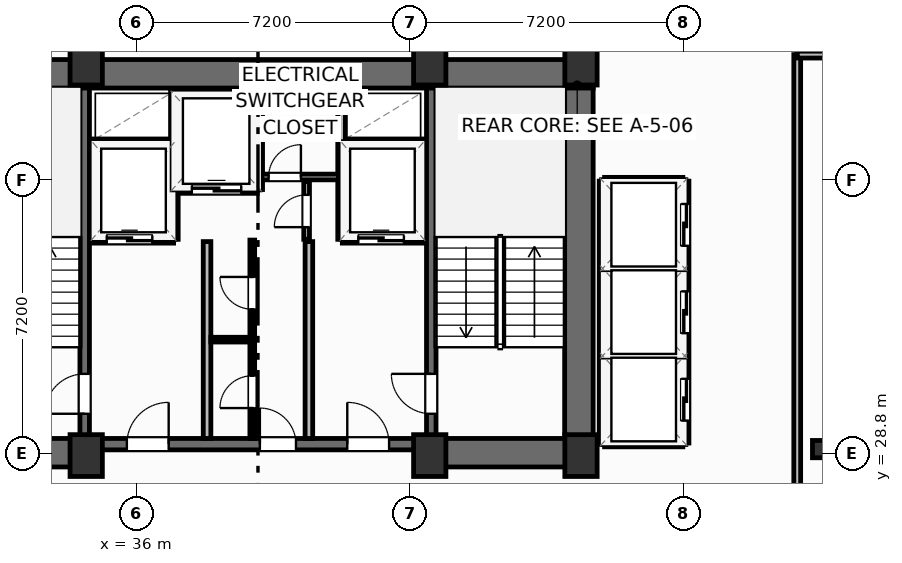
"""IFC4 building model, lengths in metres.
Left out: names, types, materials, properties, quantities, classifications, styles, units other than length and angle.
Written with IfcOpenShell. Run it as: python <this file> out.ifc"""

import sys

from ifc_helpers import new_model, si_unit, direction, frame, frame_2d, origin, origin_2d, place, context, subcontext, project, spatial, rectangle, i_section, extrude, element, fill, save


model = new_model("IFC4")
c1 = context("Model", 3, precision=1e-05, world=origin(), true_north=direction((0.0, 1.0)))
c2 = subcontext(c1, "Body", "Model", "MODEL_VIEW")
j1 = project(units=[si_unit("LENGTHUNIT", "METRE"), si_unit("PLANEANGLEUNIT", "RADIAN")], contexts=[c1])
p1 = place(None, origin())
s1 = spatial("IfcSite", under=j1, at=p1, CompositionType="ELEMENT")
p2 = place(p1, origin())
s2 = spatial("IfcBuilding", under=s1, at=p2, CompositionType="ELEMENT")
p3 = place(p2, frame((0.0, 0.0, 155.0)))
s3 = spatial("IfcBuildingStorey", under=s2, at=p3, CompositionType="ELEMENT", Elevation=155.0)
for number, where, z_axis, x_axis in (
    (1, (34.68, 28.75, 0.0), (0.0, 0.0, 1.0), (1.0, 0.0, 0.0)),
    (2, (43.72, 28.75, 0.0), (0.0, 0.0, 1.0), (1.0, 0.0, 0.0)),
    (3, (47.7, 28.75, 0.0), (0.0, 0.0, 1.0), (1.0, 0.0, 0.0)),
    (4, (34.68, 39.05, 0.0), (0.0, 0.0, 1.0), (1.0, 0.0, 0.0)),
    (5, (43.72, 39.05, 0.0), (0.0, 0.0, 1.0), (1.0, 0.0, 0.0)),
    (6, (47.7, 39.05, 0.0), (0.0, 0.0, 1.0), (1.0, 0.0, 0.0)),
):
    element("IfcColumn", number, at=place(p3, frame(where, z_axis=z_axis, x_axis=x_axis)), inside=s3, PredefinedType="COLUMN", context=c2, shape_type="SweptSolid", body=[
        extrude(rectangle(XDim=0.85, YDim=1.1, at=origin_2d()), origin(), (0.0, 0.0, 1.0), 3.7),
    ])
p4 = place(p3, frame((54.0, 28.92, 0.0), z_axis=(0.0, 0.0, 1.0), x_axis=(1.0, 0.0, 0.0)))
e7 = element("IfcColumn", 7, at=p4, inside=s3, PredefinedType="COLUMN", context=c2, shape_type="SweptSolid", body=[
    extrude(i_section(OverallWidth=0.418, OverallDepth=0.455, WebThickness=0.042, FlangeThickness=0.068, FilletRadius=0.025, at=origin_2d()), origin(), (0.0, 0.0, 1.0), 3.7),
])
p5 = place(p3, frame((30.38, 38.795, 0.0), z_axis=(0.0, 0.0, 1.0), x_axis=(1.0, 0.0, 0.0)))
e8 = element("IfcWall", 8, at=p5, inside=s3, PredefinedType="SHEAR", context=c2, shape_type="SweptSolid", body=[
    extrude(rectangle(XDim=17.64, YDim=0.75, at=frame_2d((8.82, 0.0))), origin(), (0.0, 0.0, 1.0), 3.45),
])
p6 = place(p3, frame((47.645, 29.2, 0.0), z_axis=(0.0, 0.0, 1.0), x_axis=(0.0, 1.0, 0.0)))
e9 = element("IfcWall", 9, at=p6, inside=s3, PredefinedType="SHEAR", context=c2, shape_type="SweptSolid", body=[
    extrude(rectangle(XDim=9.22, YDim=0.75, at=frame_2d((4.61, 0.0))), origin(), (0.0, 0.0, 1.0), 3.45),
])
p7 = place(p3, frame((30.38, 28.825, 0.0), z_axis=(0.0, 0.0, 1.0), x_axis=(1.0, 0.0, 0.0)))
e10 = element("IfcWall", 10, at=p7, inside=s3, PredefinedType="SHEAR", context=c2, shape_type="SweptSolid", body=[
    extrude(rectangle(XDim=4.42, YDim=0.75, at=frame_2d((2.21, 0.0))), origin(), (0.0, 0.0, 1.0), 3.45),
])
p8 = place(p3, frame((43.6, 28.825, 0.0), z_axis=(0.0, 0.0, 1.0), x_axis=(1.0, 0.0, 0.0)))
e11 = element("IfcWall", 11, at=p8, inside=s3, PredefinedType="SHEAR", context=c2, shape_type="SweptSolid", body=[
    extrude(rectangle(XDim=4.42, YDim=0.75, at=frame_2d((2.21, 0.0))), origin(), (0.0, 0.0, 1.0), 3.45),
])
p9 = place(p3, frame((34.8, 29.05, 0.0), z_axis=(0.0, 0.0, 1.0), x_axis=(1.0, 0.0, 0.0)))
e12 = element("IfcWall", 12, at=p9, inside=s3, PredefinedType="SHEAR", context=c2, shape_type="SweptSolid", body=[
    extrude(rectangle(XDim=8.8, YDim=0.3, at=frame_2d((4.4, 0.0))), origin(), (0.0, 0.0, 1.0), 3.45),
])
p10 = place(p9, frame((0.95, 0.0, 0.0)))
e13 = element("IfcOpeningElement", 13, at=p10, cuts=e12, PredefinedType="OPENING", context=c2, shape_type="SweptSolid", body=[
    extrude(rectangle(XDim=1.1, YDim=2.15, at=frame_2d((0.55, 1.075))), frame((0.0, 0.16, 0.0), z_axis=(0.0, -1.0, 0.0), x_axis=(1.0, 0.0, 0.0)), (0.0, 0.0, 1.0), 0.32),
])
p11 = place(p9, frame((6.75, 0.0, 0.0)))
e14 = element("IfcOpeningElement", 14, at=p11, cuts=e12, PredefinedType="OPENING", context=c2, shape_type="SweptSolid", body=[
    extrude(rectangle(XDim=1.1, YDim=2.15, at=frame_2d((0.55, 1.075))), frame((0.0, 0.16, 0.0), z_axis=(0.0, -1.0, 0.0), x_axis=(1.0, 0.0, 0.0)), (0.0, 0.0, 1.0), 0.32),
])
p12 = place(p9, frame((4.45, 0.0, 0.0)))
e15 = element("IfcOpeningElement", 15, at=p12, cuts=e12, PredefinedType="OPENING", context=c2, shape_type="SweptSolid", body=[
    extrude(rectangle(XDim=0.95, YDim=2.15, at=frame_2d((0.475, 1.075))), frame((0.0, 0.16, 0.0), z_axis=(0.0, -1.0, 0.0), x_axis=(1.0, 0.0, 0.0)), (0.0, 0.0, 1.0), 0.32),
])
p13 = place(p3, frame((34.64, 29.2, 0.0), z_axis=(0.0, 0.0, 1.0), x_axis=(0.0, 1.0, 0.0)))
e16 = element("IfcWall", 16, at=p13, inside=s3, PredefinedType="SHEAR", context=c2, shape_type="SweptSolid", body=[
    extrude(rectangle(XDim=9.22, YDim=0.25, at=frame_2d((4.61, 0.0))), origin(), (0.0, 0.0, 1.0), 3.45),
])
p14 = place(p13, frame((0.65, 0.0, 0.0)))
e17 = element("IfcOpeningElement", 17, at=p14, cuts=e16, PredefinedType="OPENING", context=c2, shape_type="SweptSolid", body=[
    extrude(rectangle(XDim=1.05, YDim=2.15, at=frame_2d((0.525, 1.075))), frame((0.0, 0.135, 0.0), z_axis=(0.0, -1.0, 0.0), x_axis=(1.0, 0.0, 0.0)), (0.0, 0.0, 1.0), 0.27),
])
p15 = place(p3, frame((43.76, 29.2, 0.0), z_axis=(0.0, 0.0, 1.0), x_axis=(0.0, 1.0, 0.0)))
e18 = element("IfcWall", 18, at=p15, inside=s3, PredefinedType="SHEAR", context=c2, shape_type="SweptSolid", body=[
    extrude(rectangle(XDim=9.22, YDim=0.25, at=frame_2d((4.61, 0.0))), origin(), (0.0, 0.0, 1.0), 3.45),
])
p16 = place(p15, frame((0.65, 0.0, 0.0)))
e19 = element("IfcOpeningElement", 19, at=p16, cuts=e18, PredefinedType="OPENING", context=c2, shape_type="SweptSolid", body=[
    extrude(rectangle(XDim=1.05, YDim=2.15, at=frame_2d((0.525, 1.075))), frame((0.0, 0.135, 0.0), z_axis=(0.0, -1.0, 0.0), x_axis=(1.0, 0.0, 0.0)), (0.0, 0.0, 1.0), 0.27),
])
p17 = place(p3, frame((53.45, 39.3, 0.0), z_axis=(0.0, 0.0, 1.0), x_axis=(0.0, 1.0, 0.0)))
e20 = element("IfcWall", 20, at=p17, inside=s3, PredefinedType="PARTITIONING", context=c2, shape_type="SweptSolid", body=[
    extrude(rectangle(XDim=2.31, YDim=0.125, at=frame_2d((1.155, 0.0))), origin(), (0.0, 0.0, 1.0), 3.45),
])
p18 = place(p3, frame((53.39, 19.24, 0.0), z_axis=(0.0, 0.0, 1.0), x_axis=(0.0, 1.0, 0.0)))
e21 = element("IfcWall", 21, at=p18, inside=s3, PredefinedType="PARTITIONING", context=c2, shape_type="SweptSolid", body=[
    extrude(rectangle(XDim=20.06, YDim=0.18, at=frame_2d((10.03, 0.0))), origin(), (0.0, 0.0, 1.0), 3.45),
])
p19 = place(p18, frame((7.7, 0.0, 0.0)))
e22 = element("IfcOpeningElement", 22, at=p19, cuts=e21, PredefinedType="OPENING", context=c2, shape_type="SweptSolid", body=[
    extrude(rectangle(XDim=0.95, YDim=2.05, at=frame_2d((0.475, 1.025))), frame((0.0, 0.1, 0.0), z_axis=(0.0, -1.0, 0.0), x_axis=(1.0, 0.0, 0.0)), (0.0, 0.0, 1.0), 0.2),
])
p20 = place(p3, frame((53.39, 39.3, 0.0), z_axis=(0.0, 0.0, 1.0), x_axis=(1.0, 0.0, 0.0)))
e23 = element("IfcWall", 23, at=p20, inside=s3, PredefinedType="PARTITIONING", context=c2, shape_type="SweptSolid", body=[
    extrude(rectangle(XDim=24.74, YDim=0.18, at=frame_2d((12.37, 0.0))), origin(), (0.0, 0.0, 1.0), 3.45),
])
for number, where, z_axis, x_axis in (
    (24, (37.86, 29.2, 0.0), (0.0, 0.0, 1.0), (0.0, 1.0, 0.0)),
    (25, (40.54, 29.2, 0.0), (0.0, 0.0, 1.0), (0.0, 1.0, 0.0)),
):
    element("IfcWall", number, at=place(p3, frame(where, z_axis=z_axis, x_axis=x_axis)), inside=s3, PredefinedType="PARTITIONING", context=c2, shape_type="SweptSolid", body=[
        extrude(rectangle(XDim=5.18, YDim=0.2, at=frame_2d((2.59, 0.0))), origin(), (0.0, 0.0, 1.0), 3.45),
    ])
p21 = place(p3, frame((34.8, 34.44, 0.0), z_axis=(0.0, 0.0, 1.0), x_axis=(1.0, 0.0, 0.0)))
e26 = element("IfcWall", 26, at=p21, inside=s3, PredefinedType="PARTITIONING", context=c2, shape_type="SweptSolid", body=[
    extrude(rectangle(XDim=2.18, YDim=0.2, at=frame_2d((1.09, 0.0))), origin(), (0.0, 0.0, 1.0), 3.45),
])
p22 = place(p21, frame((0.42, 0.0, 0.0)))
e27 = element("IfcOpeningElement", 27, at=p22, cuts=e26, PredefinedType="OPENING", context=c2, shape_type="SweptSolid", body=[
    extrude(rectangle(XDim=1.2, YDim=2.2, at=frame_2d((0.6, 1.1))), frame((0.0, 0.11, 0.0), z_axis=(0.0, -1.0, 0.0), x_axis=(1.0, 0.0, 0.0)), (0.0, 0.0, 1.0), 0.22),
])
p23 = place(p3, frame((34.8, 36.98, 0.0), z_axis=(0.0, 0.0, 1.0), x_axis=(1.0, 0.0, 0.0)))
e28 = element("IfcWall", 28, at=p23, inside=s3, PredefinedType="PARTITIONING", context=c2, shape_type="SweptSolid", body=[
    extrude(rectangle(XDim=2.18, YDim=0.2, at=frame_2d((1.09, 0.0))), origin(), (0.0, 0.0, 1.0), 3.45),
])
p24 = place(p3, frame((37.0, 34.44, 0.0), z_axis=(0.0, 0.0, 1.0), x_axis=(0.0, 1.0, 0.0)))
e29 = element("IfcWall", 29, at=p24, inside=s3, PredefinedType="PARTITIONING", context=c2, shape_type="SweptSolid", body=[
    extrude(rectangle(XDim=3.9, YDim=0.2, at=frame_2d((1.95, 0.0))), origin(), (0.0, 0.0, 1.0), 3.45),
])
p25 = place(p3, frame((41.42, 34.44, 0.0), z_axis=(0.0, 0.0, 1.0), x_axis=(1.0, 0.0, 0.0)))
e30 = element("IfcWall", 30, at=p25, inside=s3, PredefinedType="PARTITIONING", context=c2, shape_type="SweptSolid", body=[
    extrude(rectangle(XDim=2.18, YDim=0.2, at=frame_2d((1.09, 0.0))), origin(), (0.0, 0.0, 1.0), 3.45),
])
p26 = place(p25, frame((0.42, 0.0, 0.0)))
e31 = element("IfcOpeningElement", 31, at=p26, cuts=e30, PredefinedType="OPENING", context=c2, shape_type="SweptSolid", body=[
    extrude(rectangle(XDim=1.2, YDim=2.2, at=frame_2d((0.6, 1.1))), frame((0.0, 0.11, 0.0), z_axis=(0.0, -1.0, 0.0), x_axis=(1.0, 0.0, 0.0)), (0.0, 0.0, 1.0), 0.22),
])
p27 = place(p3, frame((41.42, 36.98, 0.0), z_axis=(0.0, 0.0, 1.0), x_axis=(1.0, 0.0, 0.0)))
e32 = element("IfcWall", 32, at=p27, inside=s3, PredefinedType="PARTITIONING", context=c2, shape_type="SweptSolid", body=[
    extrude(rectangle(XDim=2.18, YDim=0.2, at=frame_2d((1.09, 0.0))), origin(), (0.0, 0.0, 1.0), 3.45),
])
p28 = place(p3, frame((41.4, 34.44, 0.0), z_axis=(0.0, 0.0, 1.0), x_axis=(0.0, 1.0, 0.0)))
e33 = element("IfcWall", 33, at=p28, inside=s3, PredefinedType="PARTITIONING", context=c2, shape_type="SweptSolid", body=[
    extrude(rectangle(XDim=3.9, YDim=0.2, at=frame_2d((1.95, 0.0))), origin(), (0.0, 0.0, 1.0), 3.45),
])
p29 = place(p3, frame((37.06, 35.75, 0.0), z_axis=(0.0, 0.0, 1.0), x_axis=(1.0, 0.0, 0.0)))
e34 = element("IfcWall", 34, at=p29, inside=s3, PredefinedType="PARTITIONING", context=c2, shape_type="SweptSolid", body=[
    extrude(rectangle(XDim=2.12, YDim=0.2, at=frame_2d((1.06, 0.0))), origin(), (0.0, 0.0, 1.0), 3.45),
])
p30 = place(p29, frame((0.4, 0.0, 0.0)))
e35 = element("IfcOpeningElement", 35, at=p30, cuts=e34, PredefinedType="OPENING", context=c2, shape_type="SweptSolid", body=[
    extrude(rectangle(XDim=1.3, YDim=2.2, at=frame_2d((0.65, 1.1))), frame((0.0, 0.11, 0.0), z_axis=(0.0, -1.0, 0.0), x_axis=(1.0, 0.0, 0.0)), (0.0, 0.0, 1.0), 0.22),
])
p31 = place(p3, frame((39.22, 35.75, 0.0), z_axis=(0.0, 0.0, 1.0), x_axis=(0.0, 1.0, 0.0)))
e36 = element("IfcWall", 36, at=p31, inside=s3, PredefinedType="PARTITIONING", context=c2, shape_type="SweptSolid", body=[
    extrude(rectangle(XDim=2.59, YDim=0.2, at=frame_2d((1.295, 0.0))), origin(), (0.0, 0.0, 1.0), 3.45),
])
p32 = place(p3, frame((39.3, 36.08, 0.0), z_axis=(0.0, 0.0, 1.0), x_axis=(1.0, 0.0, 0.0)))
e37 = element("IfcWall", 37, at=p32, inside=s3, PredefinedType="PARTITIONING", context=c2, shape_type="SweptSolid", body=[
    extrude(rectangle(XDim=2.02, YDim=0.15, at=frame_2d((1.01, 0.0))), origin(), (0.0, 0.0, 1.0), 3.45),
])
p33 = place(p32, frame((0.18, 0.0, 0.0)))
e38 = element("IfcOpeningElement", 38, at=p33, cuts=e37, PredefinedType="OPENING", context=c2, shape_type="SweptSolid", body=[
    extrude(rectangle(XDim=0.85, YDim=2.05, at=frame_2d((0.425, 1.025))), frame((0.0, 0.085, 0.0), z_axis=(0.0, -1.0, 0.0), x_axis=(1.0, 0.0, 0.0)), (0.0, 0.0, 1.0), 0.17),
])
p34 = place(p3, frame((40.48, 34.44, 0.0), z_axis=(0.0, 0.0, 1.0), x_axis=(0.0, 1.0, 0.0)))
e39 = element("IfcWall", 39, at=p34, inside=s3, PredefinedType="PARTITIONING", context=c2, shape_type="SweptSolid", body=[
    extrude(rectangle(XDim=1.52, YDim=0.15, at=frame_2d((0.76, 0.0))), origin(), (0.0, 0.0, 1.0), 3.45),
])
p35 = place(p34, frame((0.32, 0.0, 0.0)))
e40 = element("IfcOpeningElement", 40, at=p35, cuts=e39, PredefinedType="OPENING", context=c2, shape_type="SweptSolid", body=[
    extrude(rectangle(XDim=0.85, YDim=2.05, at=frame_2d((0.425, 1.025))), frame((0.0, 0.085, 0.0), z_axis=(0.0, -1.0, 0.0), x_axis=(1.0, 0.0, 0.0)), (0.0, 0.0, 1.0), 0.17),
])
p36 = place(p3, frame((37.96, 31.8, 0.0), z_axis=(0.0, 0.0, 1.0), x_axis=(1.0, 0.0, 0.0)))
e41 = element("IfcWall", 41, at=p36, inside=s3, PredefinedType="PARTITIONING", context=c2, shape_type="SweptSolid", body=[
    extrude(rectangle(XDim=1.09, YDim=0.125, at=frame_2d((0.545, 0.0))), origin(), (0.0, 0.0, 1.0), 3.45),
])
p37 = place(p3, frame((39.05, 29.2, 0.0), z_axis=(0.0, 0.0, 1.0), x_axis=(0.0, 1.0, 0.0)))
e42 = element("IfcWall", 42, at=p37, inside=s3, PredefinedType="PARTITIONING", context=c2, shape_type="SweptSolid", body=[
    extrude(rectangle(XDim=5.22, YDim=0.125, at=frame_2d((2.61, 0.0))), origin(), (0.0, 0.0, 1.0), 3.45),
])
p38 = place(p37, frame((0.8, 0.0, 0.0)))
e43 = element("IfcOpeningElement", 43, at=p38, cuts=e42, PredefinedType="OPENING", context=c2, shape_type="SweptSolid", body=[
    extrude(rectangle(XDim=0.85, YDim=2.05, at=frame_2d((0.425, 1.025))), frame((0.0, 0.073, 0.0), z_axis=(0.0, -1.0, 0.0), x_axis=(1.0, 0.0, 0.0)), (0.0, 0.0, 1.0), 0.145),
])
p39 = place(p37, frame((3.4, 0.0, 0.0)))
e44 = element("IfcOpeningElement", 44, at=p39, cuts=e42, PredefinedType="OPENING", context=c2, shape_type="SweptSolid", body=[
    extrude(rectangle(XDim=0.85, YDim=2.05, at=frame_2d((0.425, 1.025))), frame((0.0, 0.073, 0.0), z_axis=(0.0, -1.0, 0.0), x_axis=(1.0, 0.0, 0.0)), (0.0, 0.0, 1.0), 0.145),
])
for number, where, z_axis, x_axis in (
    (45, (48.32, 31.375, 0.0), (0.0, 0.0, 1.0), (1.0, 0.0, 0.0)),
    (46, (48.32, 33.675, 0.0), (0.0, 0.0, 1.0), (1.0, 0.0, 0.0)),
):
    element("IfcWall", number, at=place(p3, frame(where, z_axis=z_axis, x_axis=x_axis)), inside=s3, PredefinedType="PARTITIONING", context=c2, shape_type="SweptSolid", body=[
        extrude(rectangle(XDim=2.06, YDim=0.2, at=frame_2d((1.03, 0.0))), origin(), (0.0, 0.0, 1.0), 3.45),
    ])
p40 = place(p3, frame((48.32, 29.08, 0.0), z_axis=(0.0, 0.0, 1.0), x_axis=(1.0, 0.0, 0.0)))
e47 = element("IfcWall", 47, at=p40, inside=s3, PredefinedType="PARTITIONING", context=c2, shape_type="SweptSolid", body=[
    extrude(rectangle(XDim=2.06, YDim=0.2, at=frame_2d((1.03, 0.0))), origin(), (0.0, 0.0, 1.0), 2.662),
])
p41 = place(p3, frame((48.32, 35.97, 0.0), z_axis=(0.0, 0.0, 1.0), x_axis=(1.0, 0.0, 0.0)))
e48 = element("IfcWall", 48, at=p41, inside=s3, PredefinedType="PARTITIONING", context=c2, shape_type="SweptSolid", body=[
    extrude(rectangle(XDim=2.06, YDim=0.2, at=frame_2d((1.03, 0.0))), origin(), (0.0, 0.0, 1.0), 3.45),
])
p42 = place(p3, frame((48.28, 29.08, 0.0), z_axis=(0.0, 0.0, 1.0), x_axis=(0.0, 1.0, 0.0)))
e49 = element("IfcWall", 49, at=p42, inside=s3, PredefinedType="PARTITIONING", context=c2, shape_type="SweptSolid", body=[
    extrude(rectangle(XDim=6.89, YDim=0.2, at=frame_2d((3.445, 0.0))), origin(), (0.0, 0.0, 1.0), 3.45),
])
p43 = place(p3, frame((50.44, 29.08, 0.0), z_axis=(0.0, 0.0, 1.0), x_axis=(0.0, 1.0, 0.0)))
e50 = element("IfcWall", 50, at=p43, inside=s3, PredefinedType="PARTITIONING", context=c2, shape_type="SweptSolid", body=[
    extrude(rectangle(XDim=6.89, YDim=0.2, at=frame_2d((3.445, 0.0))), origin(), (0.0, 0.0, 1.0), 3.45),
])
p44 = place(p43, frame((0.59, 0.0, 0.0)))
e51 = element("IfcOpeningElement", 51, at=p44, cuts=e50, PredefinedType="OPENING", context=c2, shape_type="SweptSolid", body=[
    extrude(rectangle(XDim=1.1, YDim=2.15, at=frame_2d((0.55, 1.075))), frame((0.0, 0.11, 0.0), z_axis=(0.0, -1.0, 0.0), x_axis=(1.0, 0.0, 0.0)), (0.0, 0.0, 1.0), 0.22),
])
p45 = place(p43, frame((2.89, 0.0, 0.0)))
e52 = element("IfcOpeningElement", 52, at=p45, cuts=e50, PredefinedType="OPENING", context=c2, shape_type="SweptSolid", body=[
    extrude(rectangle(XDim=1.1, YDim=2.15, at=frame_2d((0.55, 1.075))), frame((0.0, 0.11, 0.0), z_axis=(0.0, -1.0, 0.0), x_axis=(1.0, 0.0, 0.0)), (0.0, 0.0, 1.0), 0.22),
])
p46 = place(p43, frame((5.19, 0.0, 0.0)))
e53 = element("IfcOpeningElement", 53, at=p46, cuts=e50, PredefinedType="OPENING", context=c2, shape_type="SweptSolid", body=[
    extrude(rectangle(XDim=1.1, YDim=2.15, at=frame_2d((0.55, 1.075))), frame((0.0, 0.11, 0.0), z_axis=(0.0, -1.0, 0.0), x_axis=(1.0, 0.0, 0.0)), (0.0, 0.0, 1.0), 0.22),
])
p47 = place(p14, origin())
e54 = element("IfcDoor", 54, at=p47, inside=s3, OperationType="SINGLE_SWING_LEFT", PredefinedType="DOOR", context=c2, shape_type="SweptSolid", body=[
    extrude(rectangle(XDim=1.05, YDim=2.15, at=frame_2d((0.525, 1.075))), frame((0.0, 0.025, 0.0), z_axis=(0.0, -1.0, 0.0), x_axis=(1.0, 0.0, 0.0)), (0.0, 0.0, 1.0), 0.05),
])
fill(e17, e54)
p48 = place(p16, origin())
e55 = element("IfcDoor", 55, at=p48, inside=s3, OperationType="SINGLE_SWING_RIGHT", PredefinedType="DOOR", context=c2, shape_type="SweptSolid", body=[
    extrude(rectangle(XDim=1.05, YDim=2.15, at=frame_2d((0.525, 1.075))), frame((0.0, 0.025, 0.0), z_axis=(0.0, -1.0, 0.0), x_axis=(1.0, 0.0, 0.0)), (0.0, 0.0, 1.0), 0.05),
])
fill(e19, e55)
p49 = place(p10, origin())
e56 = element("IfcDoor", 56, at=p49, inside=s3, OperationType="SINGLE_SWING_RIGHT", PredefinedType="DOOR", context=c2, shape_type="SweptSolid", body=[
    extrude(rectangle(XDim=1.1, YDim=2.15, at=frame_2d((0.55, 1.075))), frame((0.0, 0.025, 0.0), z_axis=(0.0, -1.0, 0.0), x_axis=(1.0, 0.0, 0.0)), (0.0, 0.0, 1.0), 0.05),
])
fill(e13, e56)
p50 = place(p11, origin())
e57 = element("IfcDoor", 57, at=p50, inside=s3, OperationType="SINGLE_SWING_LEFT", PredefinedType="DOOR", context=c2, shape_type="SweptSolid", body=[
    extrude(rectangle(XDim=1.1, YDim=2.15, at=frame_2d((0.55, 1.075))), frame((0.0, 0.025, 0.0), z_axis=(0.0, -1.0, 0.0), x_axis=(1.0, 0.0, 0.0)), (0.0, 0.0, 1.0), 0.05),
])
fill(e14, e57)
p51 = place(p22, origin())
e58 = element("IfcDoor", 58, at=p51, inside=s3, OperationType="SLIDING_TO_LEFT", PredefinedType="DOOR", context=c2, shape_type="SweptSolid", body=[
    extrude(rectangle(XDim=1.2, YDim=2.2, at=frame_2d((0.6, 1.1))), frame((0.0, 0.025, 0.0), z_axis=(0.0, -1.0, 0.0), x_axis=(1.0, 0.0, 0.0)), (0.0, 0.0, 1.0), 0.05),
])
fill(e27, e58)
p52 = place(p26, origin())
e59 = element("IfcDoor", 59, at=p52, inside=s3, OperationType="SLIDING_TO_LEFT", PredefinedType="DOOR", context=c2, shape_type="SweptSolid", body=[
    extrude(rectangle(XDim=1.2, YDim=2.2, at=frame_2d((0.6, 1.1))), frame((0.0, 0.025, 0.0), z_axis=(0.0, -1.0, 0.0), x_axis=(1.0, 0.0, 0.0)), (0.0, 0.0, 1.0), 0.05),
])
fill(e31, e59)
p53 = place(p30, origin())
e60 = element("IfcDoor", 60, at=p53, inside=s3, OperationType="SLIDING_TO_LEFT", PredefinedType="DOOR", context=c2, shape_type="SweptSolid", body=[
    extrude(rectangle(XDim=1.3, YDim=2.2, at=frame_2d((0.65, 1.1))), frame((0.0, 0.025, 0.0), z_axis=(0.0, -1.0, 0.0), x_axis=(1.0, 0.0, 0.0)), (0.0, 0.0, 1.0), 0.05),
])
fill(e35, e60)
p54 = place(p33, origin())
e61 = element("IfcDoor", 61, at=p54, inside=s3, OperationType="SINGLE_SWING_RIGHT", PredefinedType="DOOR", context=c2, shape_type="SweptSolid", body=[
    extrude(rectangle(XDim=0.85, YDim=2.05, at=frame_2d((0.425, 1.025))), frame((0.0, 0.025, 0.0), z_axis=(0.0, -1.0, 0.0), x_axis=(1.0, 0.0, 0.0)), (0.0, 0.0, 1.0), 0.05),
])
fill(e38, e61)
p55 = place(p35, origin())
e62 = element("IfcDoor", 62, at=p55, inside=s3, OperationType="SINGLE_SWING_LEFT", PredefinedType="DOOR", context=c2, shape_type="SweptSolid", body=[
    extrude(rectangle(XDim=0.85, YDim=2.05, at=frame_2d((0.425, 1.025))), frame((0.0, 0.025, 0.0), z_axis=(0.0, -1.0, 0.0), x_axis=(1.0, 0.0, 0.0)), (0.0, 0.0, 1.0), 0.05),
])
fill(e40, e62)
p56 = place(p38, origin())
e63 = element("IfcDoor", 63, at=p56, inside=s3, OperationType="SINGLE_SWING_LEFT", PredefinedType="DOOR", context=c2, shape_type="SweptSolid", body=[
    extrude(rectangle(XDim=0.85, YDim=2.05, at=frame_2d((0.425, 1.025))), frame((0.0, 0.025, 0.0), z_axis=(0.0, -1.0, 0.0), x_axis=(1.0, 0.0, 0.0)), (0.0, 0.0, 1.0), 0.05),
])
fill(e43, e63)
p57 = place(p39, origin())
e64 = element("IfcDoor", 64, at=p57, inside=s3, OperationType="SINGLE_SWING_RIGHT", PredefinedType="DOOR", context=c2, shape_type="SweptSolid", body=[
    extrude(rectangle(XDim=0.85, YDim=2.05, at=frame_2d((0.425, 1.025))), frame((0.0, 0.025, 0.0), z_axis=(0.0, -1.0, 0.0), x_axis=(1.0, 0.0, 0.0)), (0.0, 0.0, 1.0), 0.05),
])
fill(e44, e64)
p58 = place(p12, origin())
e65 = element("IfcDoor", 65, at=p58, inside=s3, OperationType="SINGLE_SWING_LEFT", PredefinedType="DOOR", context=c2, shape_type="SweptSolid", body=[
    extrude(rectangle(XDim=0.95, YDim=2.15, at=frame_2d((0.475, 1.075))), frame((0.0, 0.025, 0.0), z_axis=(0.0, -1.0, 0.0), x_axis=(1.0, 0.0, 0.0)), (0.0, 0.0, 1.0), 0.05),
])
fill(e15, e65)
p59 = place(p44, origin())
e66 = element("IfcDoor", 66, at=p59, inside=s3, OperationType="SLIDING_TO_LEFT", PredefinedType="DOOR", context=c2, shape_type="SweptSolid", body=[
    extrude(rectangle(XDim=1.1, YDim=2.15, at=frame_2d((0.55, 1.075))), frame((0.0, 0.025, 0.0), z_axis=(0.0, -1.0, 0.0), x_axis=(1.0, 0.0, 0.0)), (0.0, 0.0, 1.0), 0.05),
])
fill(e51, e66)
p60 = place(p45, origin())
e67 = element("IfcDoor", 67, at=p60, inside=s3, OperationType="SLIDING_TO_LEFT", PredefinedType="DOOR", context=c2, shape_type="SweptSolid", body=[
    extrude(rectangle(XDim=1.1, YDim=2.15, at=frame_2d((0.55, 1.075))), frame((0.0, 0.025, 0.0), z_axis=(0.0, -1.0, 0.0), x_axis=(1.0, 0.0, 0.0)), (0.0, 0.0, 1.0), 0.05),
])
fill(e52, e67)
p61 = place(p46, origin())
e68 = element("IfcDoor", 68, at=p61, inside=s3, OperationType="SLIDING_TO_LEFT", PredefinedType="DOOR", context=c2, shape_type="SweptSolid", body=[
    extrude(rectangle(XDim=1.1, YDim=2.15, at=frame_2d((0.55, 1.075))), frame((0.0, 0.025, 0.0), z_axis=(0.0, -1.0, 0.0), x_axis=(1.0, 0.0, 0.0)), (0.0, 0.0, 1.0), 0.05),
])
fill(e53, e68)
save(model, sys.argv[1])
